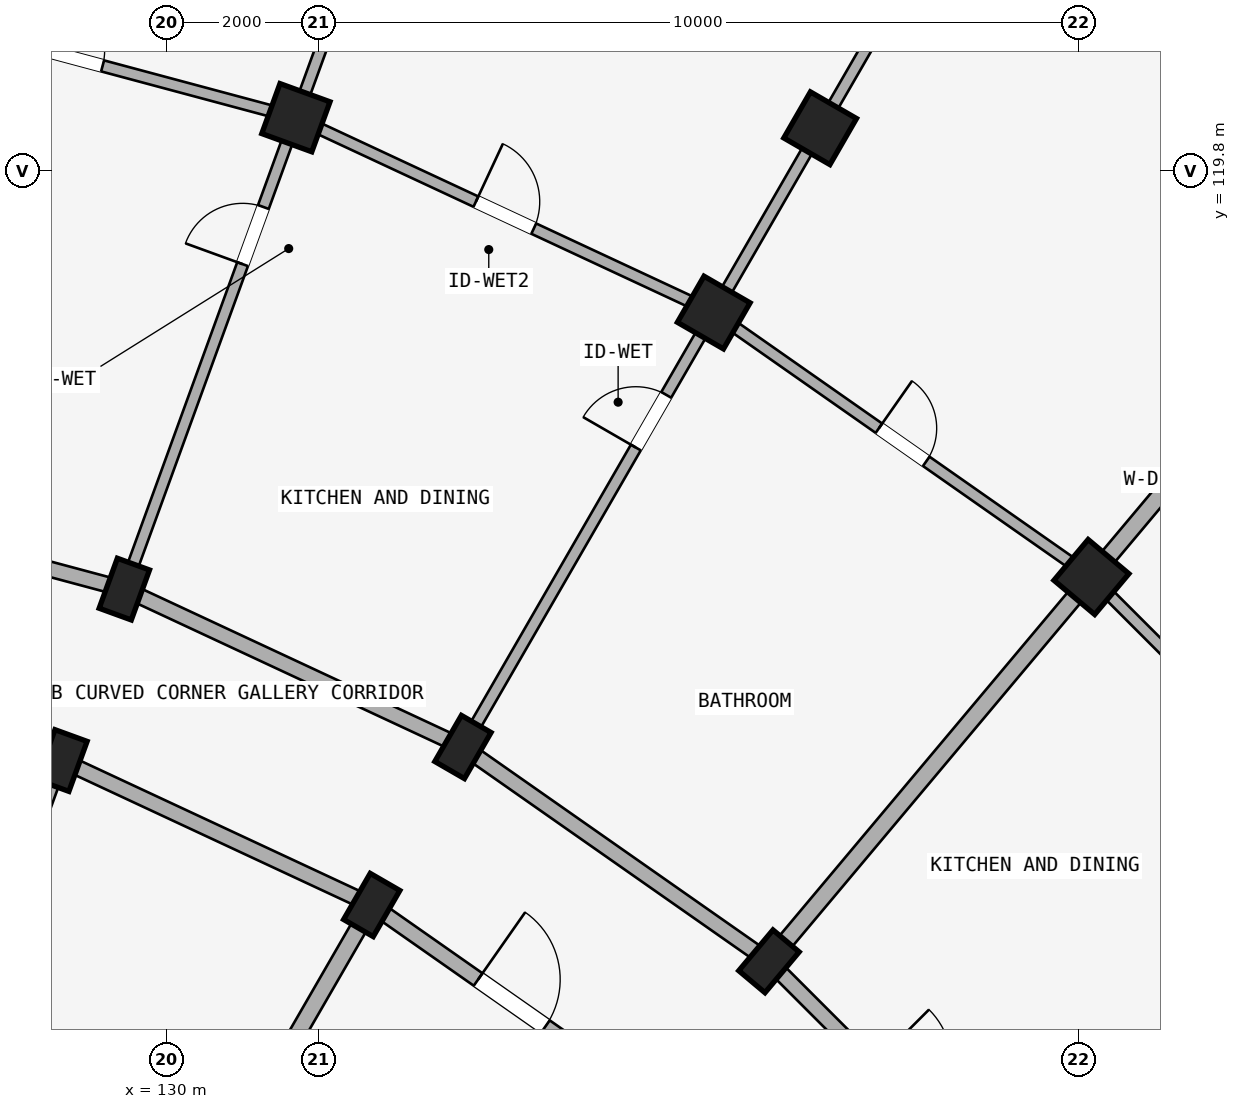
"""IFC4 building model, lengths in metres.
Left out: names, types, materials, properties, quantities, classifications, styles, units other than length and angle.
Written with IfcOpenShell. Run it as: python <this file> out.ifc"""

import sys

from ifc_helpers import new_model, si_unit, direction, frame, frame_2d, origin, origin_2d, place, context, subcontext, project, spatial, rectangle, extrude, element, fill, save


model = new_model("IFC4")
c1 = context("Model", 3, precision=1e-05, world=origin(), true_north=direction((0.0, 1.0)))
c2 = subcontext(c1, "Body", "Model", "MODEL_VIEW")
j1 = project(units=[si_unit("LENGTHUNIT", "METRE"), si_unit("PLANEANGLEUNIT", "RADIAN")], contexts=[c1])
p1 = place(None, origin())
s1 = spatial("IfcSite", under=j1, at=p1, CompositionType="ELEMENT")
p2 = place(p1, origin())
s2 = spatial("IfcBuilding", under=s1, at=p2, CompositionType="ELEMENT")
p3 = place(p2, frame((0.0, 0.0, 18.15)))
s3 = spatial("IfcBuildingStorey", under=s2, at=p3, CompositionType="ELEMENT", Elevation=18.15)
for number, where, z_axis, x_axis in (
    (1, (128.624, 112.044, 0.0), (0.0, 0.0, 1.0), (-0.94, 0.342, 0.0)),
    (2, (129.445, 114.299, 0.0), (0.0, 0.0, 1.0), (-0.94, 0.342, 0.0)),
):
    element("IfcColumn", number, at=place(p3, frame(where, z_axis=z_axis, x_axis=x_axis)), inside=s3, PredefinedType="COLUMN", context=c2, shape_type="SweptSolid", body=[
        extrude(rectangle(XDim=0.45, YDim=0.7, at=origin_2d()), origin(), (0.0, 0.0, 1.0), 2.93),
    ])
p4 = place(p3, frame((131.702, 120.501, 0.0), z_axis=(0.0, 0.0, 1.0), x_axis=(-0.939692620786, 0.342020143326, 0.0)))
e3 = element("IfcColumn", 3, at=p4, inside=s3, PredefinedType="COLUMN", context=c2, shape_type="SweptSolid", body=[
    extrude(rectangle(XDim=0.7, YDim=0.7, at=origin_2d()), origin(), (0.0, 0.0, 1.0), 2.93),
])
for number, where, z_axis, x_axis in (
    (4, (132.7, 110.144, 0.0), (0.0, 0.0, 1.0), (-0.866, 0.5, 0.0)),
    (5, (133.9, 112.222, 0.0), (0.0, 0.0, 1.0), (-0.866, 0.5, 0.0)),
):
    element("IfcColumn", number, at=place(p3, frame(where, z_axis=z_axis, x_axis=x_axis)), inside=s3, PredefinedType="COLUMN", context=c2, shape_type="SweptSolid", body=[
        extrude(rectangle(XDim=0.45, YDim=0.7, at=origin_2d()), origin(), (0.0, 0.0, 1.0), 2.93),
    ])
for number, where, z_axis, x_axis in (
    (6, (137.2, 117.938, 0.0), (0.0, 0.0, 1.0), (-0.866, 0.5, 0.0)),
    (7, (138.6, 120.363, 0.0), (0.0, 0.0, 1.0), (-0.866, 0.5, 0.0)),
):
    element("IfcColumn", number, at=place(p3, frame(where, z_axis=z_axis, x_axis=x_axis)), inside=s3, PredefinedType="COLUMN", context=c2, shape_type="SweptSolid", body=[
        extrude(rectangle(XDim=0.7, YDim=0.7, at=origin_2d()), origin(), (0.0, 0.0, 1.0), 2.93),
    ])
p5 = place(p3, frame((137.927, 109.402, 0.0), z_axis=(0.0, 0.0, 1.0), x_axis=(-0.766044443119, 0.642787609687, 0.0)))
e8 = element("IfcColumn", 8, at=p5, inside=s3, PredefinedType="COLUMN", context=c2, shape_type="SweptSolid", body=[
    extrude(rectangle(XDim=0.45, YDim=0.7, at=origin_2d()), origin(), (0.0, 0.0, 1.0), 2.93),
])
p6 = place(p3, frame((142.169, 114.458, 0.0), z_axis=(0.0, 0.0, 1.0), x_axis=(-0.766044443119, 0.642787609687, 0.0)))
e9 = element("IfcColumn", 9, at=p6, inside=s3, PredefinedType="COLUMN", context=c2, shape_type="SweptSolid", body=[
    extrude(rectangle(XDim=0.7, YDim=0.7, at=origin_2d()), origin(), (0.0, 0.0, 1.0), 2.93),
])
p7 = place(p3, frame((124.28, 113.208, 0.0), z_axis=(0.0, 0.0, 1.0), x_axis=(0.965934240054, -0.258787642463, 0.0)))
e10 = element("IfcWall", 10, at=p7, inside=s3, PredefinedType="STANDARD", context=c2, shape_type="SweptSolid", body=[
    extrude(rectangle(XDim=4.497, YDim=0.2, at=frame_2d((2.249, 0.0))), origin(), (0.0, 0.0, 1.0), 2.372),
])
p8 = place(p3, frame((124.697, 115.572, 0.0), z_axis=(0.0, 0.0, 1.0), x_axis=(0.965930095386, -0.258803112091, 0.0)))
e11 = element("IfcWall", 11, at=p8, inside=s3, PredefinedType="STANDARD", context=c2, shape_type="SweptSolid", body=[
    extrude(rectangle(XDim=4.916, YDim=0.2, at=frame_2d((2.458, 0.0))), origin(), (0.0, 0.0, 1.0), 2.372),
])
p9 = place(p8, frame((1.958, 0.0, 0.0)))
e12 = element("IfcOpeningElement", 12, at=p9, cuts=e11, PredefinedType="OPENING", context=c2, shape_type="SweptSolid", body=[
    extrude(rectangle(XDim=1.0, YDim=2.15, at=frame_2d((0.5, 1.075))), frame((0.0, 0.11, 0.0), z_axis=(0.0, -1.0, 0.0), x_axis=(1.0, 0.0, 0.0)), (0.0, 0.0, 1.0), 0.22),
])
p10 = place(p3, frame((128.624, 112.044, 0.0), z_axis=(0.0, 0.0, 1.0), x_axis=(0.906307919131, -0.422617978463, 0.0)))
e13 = element("IfcWall", 13, at=p10, inside=s3, PredefinedType="STANDARD", context=c2, shape_type="SweptSolid", body=[
    extrude(rectangle(XDim=4.497, YDim=0.2, at=frame_2d((2.249, 0.0))), origin(), (0.0, 0.0, 1.0), 2.372),
])
p11 = place(p3, frame((129.445, 114.299, 0.0), z_axis=(0.0, 0.0, 1.0), x_axis=(0.906302381024, -0.422629854778, 0.0)))
e14 = element("IfcWall", 14, at=p11, inside=s3, PredefinedType="STANDARD", context=c2, shape_type="SweptSolid", body=[
    extrude(rectangle(XDim=4.915, YDim=0.2, at=frame_2d((2.458, 0.0))), origin(), (0.0, 0.0, 1.0), 2.372),
])
p12 = place(p3, frame((132.7, 110.144, 0.0), z_axis=(0.0, 0.0, 1.0), x_axis=(0.819155404658, -0.573571637217, 0.0)))
e15 = element("IfcWall", 15, at=p12, inside=s3, PredefinedType="STANDARD", context=c2, shape_type="SweptSolid", body=[
    extrude(rectangle(XDim=4.497, YDim=0.2, at=frame_2d((2.249, 0.0))), origin(), (0.0, 0.0, 1.0), 2.372),
])
p13 = place(p12, frame((1.709, 0.0, 0.0)))
e16 = element("IfcOpeningElement", 16, at=p13, cuts=e15, PredefinedType="OPENING", context=c2, shape_type="SweptSolid", body=[
    extrude(rectangle(XDim=1.08, YDim=2.15, at=frame_2d((0.54, 1.075))), frame((0.0, 0.11, 0.0), z_axis=(0.0, -1.0, 0.0), x_axis=(1.0, 0.0, 0.0)), (0.0, 0.0, 1.0), 0.22),
])
p14 = place(p3, frame((133.9, 112.222, 0.0), z_axis=(0.0, 0.0, 1.0), x_axis=(0.819140911474, -0.573592335331, 0.0)))
e17 = element("IfcWall", 17, at=p14, inside=s3, PredefinedType="STANDARD", context=c2, shape_type="SweptSolid", body=[
    extrude(rectangle(XDim=4.916, YDim=0.2, at=frame_2d((2.458, 0.0))), origin(), (0.0, 0.0, 1.0), 2.372),
])
p15 = place(p3, frame((137.927, 109.402, 0.0), z_axis=(0.0, 0.0, 1.0), x_axis=(0.707106781187, -0.707106781187, 0.0)))
e18 = element("IfcWall", 18, at=p15, inside=s3, PredefinedType="STANDARD", context=c2, shape_type="SweptSolid", body=[
    extrude(rectangle(XDim=4.916, YDim=0.2, at=frame_2d((2.458, 0.0))), origin(), (0.0, 0.0, 1.0), 2.372),
])
p16 = place(p15, frame((1.938, 0.0, 0.0)))
e19 = element("IfcOpeningElement", 19, at=p16, cuts=e18, PredefinedType="OPENING", context=c2, shape_type="SweptSolid", body=[
    extrude(rectangle(XDim=1.04, YDim=2.15, at=frame_2d((0.52, 1.075))), frame((0.0, 0.11, 0.0), z_axis=(0.0, -1.0, 0.0), x_axis=(1.0, 0.0, 0.0)), (0.0, 0.0, 1.0), 0.22),
])
p17 = place(p3, frame((126.298, 105.654, 0.0), z_axis=(0.0, 0.0, 1.0), x_axis=(0.342010221662, 0.939696231917, 0.0)))
e20 = element("IfcWall", 20, at=p17, inside=s3, PredefinedType="PARTITIONING", context=c2, shape_type="SweptSolid", body=[
    extrude(rectangle(XDim=6.75, YDim=0.15, at=frame_2d((3.375, 0.0))), origin(), (0.0, 0.0, 1.0), 2.372),
])
p18 = place(p17, frame((3.222, 0.0, 0.0)))
e21 = element("IfcOpeningElement", 21, at=p18, cuts=e20, PredefinedType="OPENING", context=c2, shape_type="SweptSolid", body=[
    extrude(rectangle(XDim=0.98, YDim=2.12, at=frame_2d((0.49, 1.06))), frame((0.0, 0.085, 0.0), z_axis=(0.0, -1.0, 0.0), x_axis=(1.0, 0.0, 0.0)), (0.0, 0.0, 1.0), 0.17),
])
p19 = place(p3, frame((129.479, 114.393, 0.0), z_axis=(0.0, 0.0, 1.0), x_axis=(0.342022120477, 0.939691901159, 0.0)))
e22 = element("IfcWall", 22, at=p19, inside=s3, PredefinedType="PARTITIONING", context=c2, shape_type="SweptSolid", body=[
    extrude(rectangle(XDim=17.42, YDim=0.15, at=frame_2d((8.71, 0.0))), origin(), (0.0, 0.0, 1.0), 2.372),
])
p20 = place(p19, frame((4.45, 0.0, 0.0)))
e23 = element("IfcOpeningElement", 23, at=p20, cuts=e22, PredefinedType="OPENING", context=c2, shape_type="SweptSolid", body=[
    extrude(rectangle(XDim=0.8, YDim=2.1, at=frame_2d((0.4, 1.05))), frame((0.0, 0.085, 0.0), z_axis=(0.0, -1.0, 0.0), x_axis=(1.0, 0.0, 0.0)), (0.0, 0.0, 1.0), 0.17),
])
p21 = place(p3, frame((129.3, 104.254, 0.0), z_axis=(0.0, 0.0, 1.0), x_axis=(0.499997969693, 0.866026575979, 0.0)))
e24 = element("IfcWall", 24, at=p21, inside=s3, PredefinedType="STANDARD", context=c2, shape_type="SweptSolid", body=[
    extrude(rectangle(XDim=6.75, YDim=0.22, at=frame_2d((3.375, 0.0))), origin(), (0.0, 0.0, 1.0), 2.372),
])
p22 = place(p3, frame((133.95, 112.309, 0.0), z_axis=(0.0, 0.0, 1.0), x_axis=(0.499997843263, 0.866026648973, 0.0)))
e25 = element("IfcWall", 25, at=p22, inside=s3, PredefinedType="PARTITIONING", context=c2, shape_type="SweptSolid", body=[
    extrude(rectangle(XDim=17.42, YDim=0.15, at=frame_2d((8.71, 0.0))), origin(), (0.0, 0.0, 1.0), 2.372),
])
p23 = place(p22, frame((4.45, 0.0, 0.0)))
e26 = element("IfcOpeningElement", 26, at=p23, cuts=e25, PredefinedType="OPENING", context=c2, shape_type="SweptSolid", body=[
    extrude(rectangle(XDim=0.8, YDim=2.1, at=frame_2d((0.4, 1.05))), frame((0.0, 0.085, 0.0), z_axis=(0.0, -1.0, 0.0), x_axis=(1.0, 0.0, 0.0)), (0.0, 0.0, 1.0), 0.17),
])
p24 = place(p3, frame((137.991, 109.479, 0.0), z_axis=(0.0, 0.0, 1.0), x_axis=(0.642784757967, 0.766046835987, 0.0)))
e27 = element("IfcWall", 27, at=p24, inside=s3, PredefinedType="STANDARD", context=c2, shape_type="SweptSolid", body=[
    extrude(rectangle(XDim=17.42, YDim=0.22, at=frame_2d((8.71, 0.0))), origin(), (0.0, 0.0, 1.0), 2.372),
])
p25 = place(p3, frame((141.479, 105.991, 0.0), z_axis=(0.0, 0.0, 1.0), x_axis=(0.766046835987, 0.642784757967, 0.0)))
e28 = element("IfcWall", 28, at=p25, inside=s3, PredefinedType="PARTITIONING", context=c2, shape_type="SweptSolid", body=[
    extrude(rectangle(XDim=17.42, YDim=0.15, at=frame_2d((8.71, 0.0))), origin(), (0.0, 0.0, 1.0), 2.372),
])
p26 = place(p25, frame((4.45, 0.0, 0.0)))
e29 = element("IfcOpeningElement", 29, at=p26, cuts=e28, PredefinedType="OPENING", context=c2, shape_type="SweptSolid", body=[
    extrude(rectangle(XDim=0.8, YDim=2.1, at=frame_2d((0.4, 1.05))), frame((0.0, 0.085, 0.0), z_axis=(0.0, -1.0, 0.0), x_axis=(1.0, 0.0, 0.0)), (0.0, 0.0, 1.0), 0.17),
])
p27 = place(p3, frame((125.843, 122.071, 0.0), z_axis=(0.0, 0.0, 1.0), x_axis=(0.965923618901, -0.258827283048, 0.0)))
e30 = element("IfcWall", 30, at=p27, inside=s3, PredefinedType="PLUMBINGWALL", context=c2, shape_type="SweptSolid", body=[
    extrude(rectangle(XDim=6.066, YDim=0.15, at=frame_2d((3.033, 0.0))), origin(), (0.0, 0.0, 1.0), 2.372),
])
p28 = place(p27, frame((2.633, 0.0, 0.0)))
e31 = element("IfcOpeningElement", 31, at=p28, cuts=e30, PredefinedType="OPENING", context=c2, shape_type="SweptSolid", body=[
    extrude(rectangle(XDim=0.8, YDim=2.1, at=frame_2d((0.4, 1.05))), frame((0.0, 0.085, 0.0), z_axis=(0.0, -1.0, 0.0), x_axis=(1.0, 0.0, 0.0)), (0.0, 0.0, 1.0), 0.17),
])
p29 = place(p3, frame((131.702, 120.501, 0.0), z_axis=(0.0, 0.0, 1.0), x_axis=(0.906312656069, -0.42260781991, 0.0)))
e32 = element("IfcWall", 32, at=p29, inside=s3, PredefinedType="PLUMBINGWALL", context=c2, shape_type="SweptSolid", body=[
    extrude(rectangle(XDim=6.066, YDim=0.15, at=frame_2d((3.033, 0.0))), origin(), (0.0, 0.0, 1.0), 2.372),
])
p30 = place(p29, frame((2.613, 0.0, 0.0)))
e33 = element("IfcOpeningElement", 33, at=p30, cuts=e32, PredefinedType="OPENING", context=c2, shape_type="SweptSolid", body=[
    extrude(rectangle(XDim=0.84, YDim=2.1, at=frame_2d((0.42, 1.05))), frame((0.0, 0.085, 0.0), z_axis=(0.0, -1.0, 0.0), x_axis=(1.0, 0.0, 0.0)), (0.0, 0.0, 1.0), 0.17),
])
p31 = place(p3, frame((137.2, 117.938, 0.0), z_axis=(0.0, 0.0, 1.0), x_axis=(0.81913926159, -0.573594691504, 0.0)))
e34 = element("IfcWall", 34, at=p31, inside=s3, PredefinedType="PLUMBINGWALL", context=c2, shape_type="SweptSolid", body=[
    extrude(rectangle(XDim=6.066, YDim=0.15, at=frame_2d((3.033, 0.0))), origin(), (0.0, 0.0, 1.0), 2.372),
])
p32 = place(p31, frame((2.653, 0.0, 0.0)))
e35 = element("IfcOpeningElement", 35, at=p32, cuts=e34, PredefinedType="OPENING", context=c2, shape_type="SweptSolid", body=[
    extrude(rectangle(XDim=0.76, YDim=2.05, at=frame_2d((0.38, 1.025))), frame((0.0, 0.085, 0.0), z_axis=(0.0, -1.0, 0.0), x_axis=(1.0, 0.0, 0.0)), (0.0, 0.0, 1.0), 0.17),
])
p33 = place(p3, frame((142.169, 114.458, 0.0), z_axis=(0.0, 0.0, 1.0), x_axis=(0.707106781187, -0.707106781187, 0.0)))
e36 = element("IfcWall", 36, at=p33, inside=s3, PredefinedType="PLUMBINGWALL", context=c2, shape_type="SweptSolid", body=[
    extrude(rectangle(XDim=6.066, YDim=0.15, at=frame_2d((3.033, 0.0))), origin(), (0.0, 0.0, 1.0), 2.372),
])
p34 = place(p33, frame((2.633, 0.0, 0.0)))
e37 = element("IfcOpeningElement", 37, at=p34, cuts=e36, PredefinedType="OPENING", context=c2, shape_type="SweptSolid", body=[
    extrude(rectangle(XDim=0.8, YDim=2.1, at=frame_2d((0.4, 1.05))), frame((0.0, 0.085, 0.0), z_axis=(0.0, -1.0, 0.0), x_axis=(1.0, 0.0, 0.0)), (0.0, 0.0, 1.0), 0.17),
])
p35 = place(p20, origin())
e38 = element("IfcDoor", 38, at=p35, inside=s3, OperationType="SINGLE_SWING_LEFT", PredefinedType="DOOR", context=c2, shape_type="SweptSolid", body=[
    extrude(rectangle(XDim=0.8, YDim=2.1, at=frame_2d((0.4, 1.05))), frame((0.0, 0.025, 0.0), z_axis=(0.0, -1.0, 0.0), x_axis=(1.0, 0.0, 0.0)), (0.0, 0.0, 1.0), 0.05),
])
fill(e23, e38)
p36 = place(p23, frame((0.8, 0.0, 0.0), z_axis=(0.0, 0.0, 1.0), x_axis=(-1.0, 0.0, 0.0)))
e39 = element("IfcDoor", 39, at=p36, inside=s3, OperationType="SINGLE_SWING_RIGHT", PredefinedType="DOOR", context=c2, shape_type="SweptSolid", body=[
    extrude(rectangle(XDim=0.8, YDim=2.1, at=frame_2d((0.4, 1.05))), frame((0.0, 0.025, 0.0), z_axis=(0.0, -1.0, 0.0), x_axis=(1.0, 0.0, 0.0)), (0.0, 0.0, 1.0), 0.05),
])
fill(e26, e39)
p37 = place(p28, frame((0.8, 0.0, 0.0), z_axis=(0.0, 0.0, 1.0), x_axis=(-1.0, 0.0, 0.0)))
e40 = element("IfcDoor", 40, at=p37, inside=s3, OperationType="SINGLE_SWING_RIGHT", PredefinedType="DOOR", context=c2, shape_type="SweptSolid", body=[
    extrude(rectangle(XDim=0.8, YDim=2.1, at=frame_2d((0.4, 1.05))), frame((0.0, 0.025, 0.0), z_axis=(0.0, -1.0, 0.0), x_axis=(1.0, 0.0, 0.0)), (0.0, 0.0, 1.0), 0.05),
])
fill(e31, e40)
p38 = place(p30, origin())
e41 = element("IfcDoor", 41, at=p38, inside=s3, OperationType="SINGLE_SWING_LEFT", PredefinedType="DOOR", context=c2, shape_type="SweptSolid", body=[
    extrude(rectangle(XDim=0.84, YDim=2.1, at=frame_2d((0.42, 1.05))), frame((0.0, 0.025, 0.0), z_axis=(0.0, -1.0, 0.0), x_axis=(1.0, 0.0, 0.0)), (0.0, 0.0, 1.0), 0.05),
])
fill(e33, e41)
p39 = place(p32, frame((0.76, 0.0, 0.0), z_axis=(0.0, 0.0, 1.0), x_axis=(-1.0, 0.0, 0.0)))
e42 = element("IfcDoor", 42, at=p39, inside=s3, OperationType="SINGLE_SWING_RIGHT", PredefinedType="DOOR", context=c2, shape_type="SweptSolid", body=[
    extrude(rectangle(XDim=0.76, YDim=2.05, at=frame_2d((0.38, 1.025))), frame((0.0, 0.025, 0.0), z_axis=(0.0, -1.0, 0.0), x_axis=(1.0, 0.0, 0.0)), (0.0, 0.0, 1.0), 0.05),
])
fill(e35, e42)
p40 = place(p13, origin())
e43 = element("IfcDoor", 43, at=p40, inside=s3, OperationType="SINGLE_SWING_LEFT", PredefinedType="DOOR", context=c2, shape_type="SweptSolid", body=[
    extrude(rectangle(XDim=1.08, YDim=2.15, at=frame_2d((0.54, 1.075))), frame((0.0, 0.025, 0.0), z_axis=(0.0, -1.0, 0.0), x_axis=(1.0, 0.0, 0.0)), (0.0, 0.0, 1.0), 0.05),
])
fill(e16, e43)
save(model, sys.argv[1])
